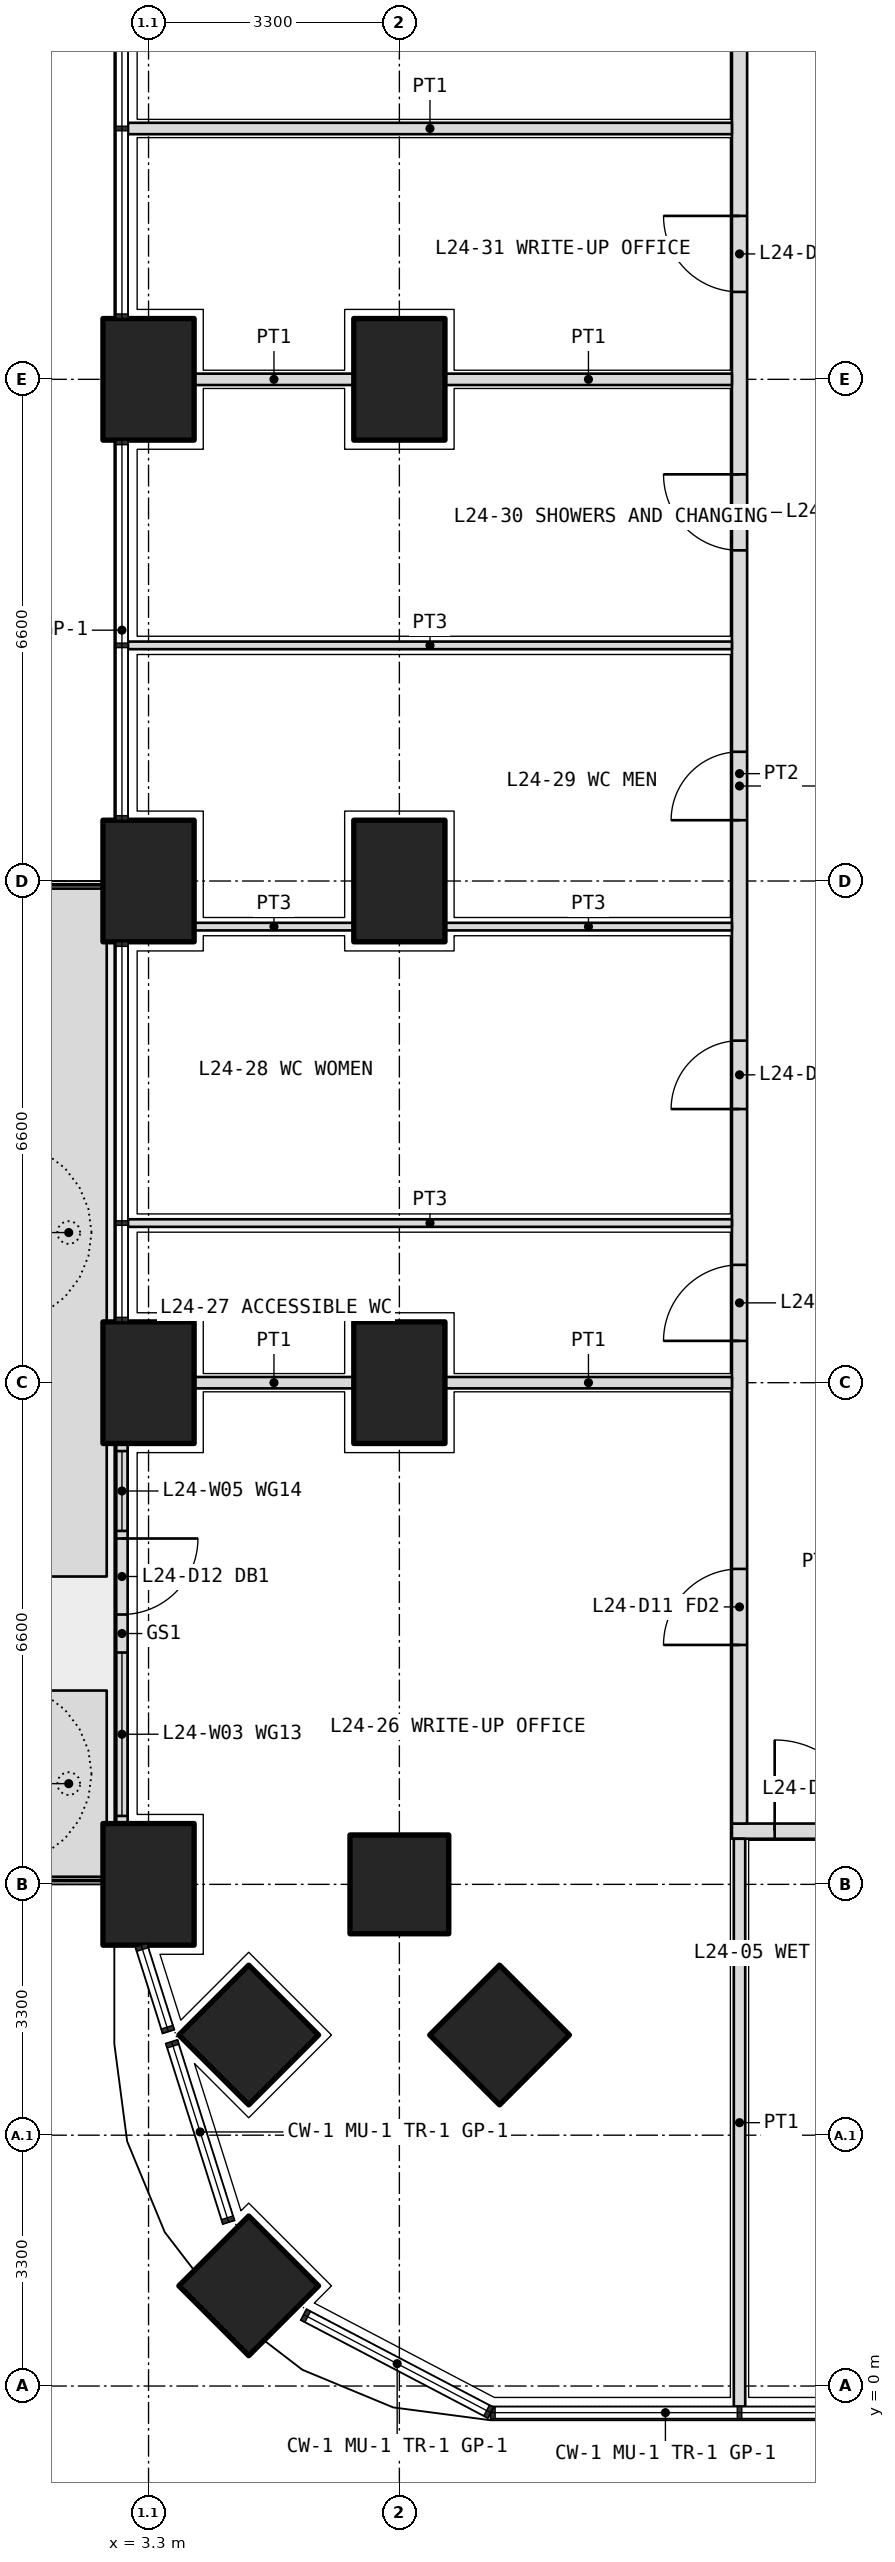
"""IFC4 building model, lengths in metres.
Left out: names, types, materials, properties, quantities, classifications, styles, units other than length and angle.
Written with IfcOpenShell. Run it as: python <this file> out.ifc"""

import sys

from ifc_helpers import new_model, si_unit, direction, frame, frame_2d, origin, origin_2d, place, context, subcontext, project, spatial, polyline, rectangle, outline, extrude, element, fill, save


model = new_model("IFC4")
c1 = context("Model", 3, precision=1e-05, world=origin(), true_north=direction((0.0, 1.0)))
c2 = subcontext(c1, "Body", "Model", "MODEL_VIEW")
j1 = project(units=[si_unit("LENGTHUNIT", "METRE"), si_unit("PLANEANGLEUNIT", "RADIAN")], contexts=[c1])
p1 = place(None, origin())
s1 = spatial("IfcSite", under=j1, at=p1, CompositionType="ELEMENT")
p2 = place(p1, origin())
s2 = spatial("IfcBuilding", under=s1, at=p2, CompositionType="ELEMENT")
p3 = place(p2, frame((0.0, 0.0, 107.4)))
s3 = spatial("IfcBuildingStorey", under=s2, at=p3, CompositionType="ELEMENT", Elevation=107.4)
p4 = place(p3, frame((4.618, 1.318, 0.0), z_axis=(0.0, 0.0, 1.0), x_axis=(0.707106781187, 0.707106781187, 0.0)))
e1 = element("IfcColumn", 1, at=p4, inside=s3, PredefinedType="COLUMN", context=c2, shape_type="SweptSolid", body=[
    extrude(rectangle(XDim=1.3, YDim=1.3, at=origin_2d()), origin(), (0.0, 0.0, 1.0), 4.2),
])
for number, where, z_axis, x_axis in (
    (2, (3.3, 6.6, 0.0), (0.0, 0.0, 1.0), (0.0, 1.0, 0.0)),
    (3, (3.3, 13.2, 0.0), (0.0, 0.0, 1.0), (0.0, 1.0, 0.0)),
    (4, (3.3, 19.8, 0.0), (0.0, 0.0, 1.0), (0.0, 1.0, 0.0)),
    (5, (3.3, 26.4, 0.0), (0.0, 0.0, 1.0), (0.0, 1.0, 0.0)),
):
    element("IfcColumn", number, at=place(p3, frame(where, z_axis=z_axis, x_axis=x_axis)), inside=s3, PredefinedType="COLUMN", context=c2, shape_type="SweptSolid", body=[
        extrude(rectangle(XDim=1.6, YDim=1.2, at=origin_2d()), origin(), (0.0, 0.0, 1.0), 4.2),
    ])
for number, where, z_axis, x_axis in (
    (6, (6.6, 6.6, 0.0), (0.0, 0.0, 1.0), (1.0, 0.0, 0.0)),
    (7, (4.618, 4.618, 0.0), (0.0, 0.0, 1.0), (0.707, 0.707, 0.0)),
    (8, (7.918, 4.618, 0.0), (0.0, 0.0, 1.0), (0.707, 0.707, 0.0)),
):
    element("IfcColumn", number, at=place(p3, frame(where, z_axis=z_axis, x_axis=x_axis)), inside=s3, PredefinedType="COLUMN", context=c2, shape_type="SweptSolid", body=[
        extrude(rectangle(XDim=1.3, YDim=1.3, at=origin_2d()), origin(), (0.0, 0.0, 1.0), 4.2),
    ])
for number, where, z_axis, x_axis in (
    (9, (6.6, 13.2, 0.0), (0.0, 0.0, 1.0), (0.0, 1.0, 0.0)),
    (10, (6.6, 19.8, 0.0), (0.0, 0.0, 1.0), (0.0, 1.0, 0.0)),
    (11, (6.6, 26.4, 0.0), (0.0, 0.0, 1.0), (0.0, 1.0, 0.0)),
):
    element("IfcColumn", number, at=place(p3, frame(where, z_axis=z_axis, x_axis=x_axis)), inside=s3, PredefinedType="COLUMN", context=c2, shape_type="SweptSolid", body=[
        extrude(rectangle(XDim=1.6, YDim=1.2, at=origin_2d()), origin(), (0.0, 0.0, 1.0), 4.2),
    ])
p5 = place(p3, origin())
e12 = element("IfcWall", 12, at=p5, inside=s3, PredefinedType="USERDEFINED", context=c2, shape_type="SweptSolid", body=[
    extrude(outline(polyline([(1.75, 6.7), (2.75, 6.7), (2.75, 9.15), (1.75, 9.15), (1.75, 6.7)]), holes=[polyline([(1.9, 6.85), (2.6, 6.85), (2.6, 9.0), (1.9, 9.0), (1.9, 6.85)])]), origin(), (0.0, 0.0, 1.0), 1.05),
])
p6 = place(p3, origin())
e13 = element("IfcWall", 13, at=p6, inside=s3, PredefinedType="USERDEFINED", context=c2, shape_type="SweptSolid", body=[
    extrude(outline(polyline([(1.75, 10.65), (2.75, 10.65), (2.75, 19.7), (1.75, 19.7), (1.75, 10.65)]), holes=[polyline([(1.9, 10.8), (2.6, 10.8), (2.6, 19.55), (1.9, 19.55), (1.9, 10.8)])]), origin(), (0.0, 0.0, 1.0), 1.05),
])
p7 = place(p3, frame((2.95, 12.4, 0.0), z_axis=(0.0, 0.0, 1.0), x_axis=(0.0, -1.0, 0.0)))
e14 = element("IfcWall", 14, at=p7, inside=s3, PredefinedType="SOLIDWALL", context=c2, shape_type="SweptSolid", body=[
    extrude(rectangle(XDim=5.0, YDim=0.15, at=frame_2d((2.5, 0.0))), origin(), (0.0, 0.0, 1.0), 2.7),
])
p8 = place(p7, frame((1.25, 0.0, 0.0)))
e15 = element("IfcOpeningElement", 15, at=p8, cuts=e14, PredefinedType="OPENING", context=c2, shape_type="SweptSolid", body=[
    extrude(rectangle(XDim=1.0, YDim=2.4, at=frame_2d((0.5, 1.2))), frame((0.0, 0.085, 0.0), z_axis=(0.0, -1.0, 0.0), x_axis=(1.0, 0.0, 0.0)), (0.0, 0.0, 1.0), 0.17),
])
p9 = place(p7, frame((0.1, 0.0, 0.1)))
e16 = element("IfcOpeningElement", 16, at=p9, cuts=e14, PredefinedType="OPENING", context=c2, shape_type="SweptSolid", body=[
    extrude(rectangle(XDim=1.05, YDim=2.3, at=frame_2d((0.525, 1.15))), frame((0.0, 0.085, 0.0), z_axis=(0.0, -1.0, 0.0), x_axis=(1.0, 0.0, 0.0)), (0.0, 0.0, 1.0), 0.17),
])
p10 = place(p7, frame((2.75, 0.0, 0.1)))
e17 = element("IfcOpeningElement", 17, at=p10, cuts=e14, PredefinedType="OPENING", context=c2, shape_type="SweptSolid", body=[
    extrude(rectangle(XDim=2.15, YDim=2.3, at=frame_2d((1.075, 1.15))), frame((0.0, 0.085, 0.0), z_axis=(0.0, -1.0, 0.0), x_axis=(1.0, 0.0, 0.0)), (0.0, 0.0, 1.0), 0.17),
])
p11 = place(p3, frame((10.975, 7.3, 0.0), z_axis=(0.0, 0.0, 1.0), x_axis=(1.0, 0.0, 0.0)))
e18 = element("IfcWall", 18, at=p11, inside=s3, PredefinedType="PARTITIONING", context=c2, shape_type="SweptSolid", body=[
    extrude(rectangle(XDim=30.85, YDim=0.2, at=frame_2d((15.425, 0.0))), origin(), (0.0, 0.0, 1.0), 2.85),
])
p12 = place(p11, frame((0.562, 0.0, 0.0)))
e19 = element("IfcOpeningElement", 19, at=p12, cuts=e18, PredefinedType="OPENING", context=c2, shape_type="SweptSolid", body=[
    extrude(rectangle(XDim=1.2, YDim=2.1, at=frame_2d((0.6, 1.05))), frame((0.0, 0.11, 0.0), z_axis=(0.0, -1.0, 0.0), x_axis=(1.0, 0.0, 0.0)), (0.0, 0.0, 1.0), 0.22),
])
p13 = place(p11, frame((8.325, 0.0, 0.0)))
e20 = element("IfcOpeningElement", 20, at=p13, cuts=e18, PredefinedType="OPENING", context=c2, shape_type="SweptSolid", body=[
    extrude(rectangle(XDim=1.0, YDim=2.1, at=frame_2d((0.5, 1.05))), frame((0.0, 0.11, 0.0), z_axis=(0.0, -1.0, 0.0), x_axis=(1.0, 0.0, 0.0)), (0.0, 0.0, 1.0), 0.22),
])
p14 = place(p11, frame((16.475, 0.0, 0.0)))
e21 = element("IfcOpeningElement", 21, at=p14, cuts=e18, PredefinedType="OPENING", context=c2, shape_type="SweptSolid", body=[
    extrude(rectangle(XDim=1.2, YDim=2.1, at=frame_2d((0.6, 1.05))), frame((0.0, 0.11, 0.0), z_axis=(0.0, -1.0, 0.0), x_axis=(1.0, 0.0, 0.0)), (0.0, 0.0, 1.0), 0.22),
])
p15 = place(p11, frame((21.525, 0.0, 0.0)))
e22 = element("IfcOpeningElement", 22, at=p15, cuts=e18, PredefinedType="OPENING", context=c2, shape_type="SweptSolid", body=[
    extrude(rectangle(XDim=1.0, YDim=2.1, at=frame_2d((0.5, 1.05))), frame((0.0, 0.11, 0.0), z_axis=(0.0, -1.0, 0.0), x_axis=(1.0, 0.0, 0.0)), (0.0, 0.0, 1.0), 0.22),
])
p16 = place(p11, frame((27.538, 0.0, 0.0)))
e23 = element("IfcOpeningElement", 23, at=p16, cuts=e18, PredefinedType="OPENING", context=c2, shape_type="SweptSolid", body=[
    extrude(rectangle(XDim=1.0, YDim=2.1, at=frame_2d((0.5, 1.05))), frame((0.0, 0.11, 0.0), z_axis=(0.0, -1.0, 0.0), x_axis=(1.0, 0.0, 0.0)), (0.0, 0.0, 1.0), 0.22),
])
p17 = place(p3, frame((11.075, 7.4, 0.0), z_axis=(0.0, 0.0, 1.0), x_axis=(0.0, 1.0, 0.0)))
e24 = element("IfcWall", 24, at=p17, inside=s3, PredefinedType="PARTITIONING", context=c2, shape_type="SweptSolid", body=[
    extrude(rectangle(XDim=27.625, YDim=0.2, at=frame_2d((13.812, 0.0))), origin(), (0.0, 0.0, 1.0), 2.85),
])
p18 = place(p17, frame((2.35, 0.0, 0.0)))
e25 = element("IfcOpeningElement", 25, at=p18, cuts=e24, PredefinedType="OPENING", context=c2, shape_type="SweptSolid", body=[
    extrude(rectangle(XDim=1.0, YDim=2.1, at=frame_2d((0.5, 1.05))), frame((0.0, 0.11, 0.0), z_axis=(0.0, -1.0, 0.0), x_axis=(1.0, 0.0, 0.0)), (0.0, 0.0, 1.0), 0.22),
])
p19 = place(p17, frame((6.35, 0.0, 0.0)))
e26 = element("IfcOpeningElement", 26, at=p19, cuts=e24, PredefinedType="OPENING", context=c2, shape_type="SweptSolid", body=[
    extrude(rectangle(XDim=1.0, YDim=2.1, at=frame_2d((0.5, 1.05))), frame((0.0, 0.11, 0.0), z_axis=(0.0, -1.0, 0.0), x_axis=(1.0, 0.0, 0.0)), (0.0, 0.0, 1.0), 0.22),
])
p20 = place(p17, frame((9.4, 0.0, 0.0)))
e27 = element("IfcOpeningElement", 27, at=p20, cuts=e24, PredefinedType="OPENING", context=c2, shape_type="SweptSolid", body=[
    extrude(rectangle(XDim=0.9, YDim=2.1, at=frame_2d((0.45, 1.05))), frame((0.0, 0.11, 0.0), z_axis=(0.0, -1.0, 0.0), x_axis=(1.0, 0.0, 0.0)), (0.0, 0.0, 1.0), 0.22),
])
p21 = place(p17, frame((13.2, 0.0, 0.0)))
e28 = element("IfcOpeningElement", 28, at=p21, cuts=e24, PredefinedType="OPENING", context=c2, shape_type="SweptSolid", body=[
    extrude(rectangle(XDim=0.9, YDim=2.1, at=frame_2d((0.45, 1.05))), frame((0.0, 0.11, 0.0), z_axis=(0.0, -1.0, 0.0), x_axis=(1.0, 0.0, 0.0)), (0.0, 0.0, 1.0), 0.22),
])
p22 = place(p17, frame((16.75, 0.0, 0.0)))
e29 = element("IfcOpeningElement", 29, at=p22, cuts=e24, PredefinedType="OPENING", context=c2, shape_type="SweptSolid", body=[
    extrude(rectangle(XDim=1.0, YDim=2.1, at=frame_2d((0.5, 1.05))), frame((0.0, 0.11, 0.0), z_axis=(0.0, -1.0, 0.0), x_axis=(1.0, 0.0, 0.0)), (0.0, 0.0, 1.0), 0.22),
])
p23 = place(p17, frame((20.15, 0.0, 0.0)))
e30 = element("IfcOpeningElement", 30, at=p23, cuts=e24, PredefinedType="OPENING", context=c2, shape_type="SweptSolid", body=[
    extrude(rectangle(XDim=1.0, YDim=2.1, at=frame_2d((0.5, 1.05))), frame((0.0, 0.11, 0.0), z_axis=(0.0, -1.0, 0.0), x_axis=(1.0, 0.0, 0.0)), (0.0, 0.0, 1.0), 0.22),
])
p24 = place(p17, frame((24.512, 0.0, 0.0)))
e31 = element("IfcOpeningElement", 31, at=p24, cuts=e24, PredefinedType="OPENING", context=c2, shape_type="SweptSolid", body=[
    extrude(rectangle(XDim=1.0, YDim=2.1, at=frame_2d((0.5, 1.05))), frame((0.0, 0.11, 0.0), z_axis=(0.0, -1.0, 0.0), x_axis=(1.0, 0.0, 0.0)), (0.0, 0.0, 1.0), 0.22),
])
p25 = place(p3, frame((11.075, -0.27, 0.0), z_axis=(0.0, 0.0, 1.0), x_axis=(0.0, 1.0, 0.0)))
e32 = element("IfcWall", 32, at=p25, inside=s3, PredefinedType="PARTITIONING", context=c2, shape_type="SweptSolid", body=[
    extrude(rectangle(XDim=7.47, YDim=0.15, at=frame_2d((3.735, 0.0))), origin(), (0.0, 0.0, 1.0), 2.7),
])
p26 = place(p3, frame((3.03, 15.3, 0.0), z_axis=(0.0, 0.0, 1.0), x_axis=(1.0, 0.0, 0.0)))
e33 = element("IfcWall", 33, at=p26, inside=s3, PredefinedType="PARTITIONING", context=c2, shape_type="SweptSolid", body=[
    extrude(rectangle(XDim=7.945, YDim=0.1, at=frame_2d((3.973, 0.0))), origin(), (0.0, 0.0, 1.0), 2.7),
])
p27 = place(p3, frame((3.9, 19.2, 0.0), z_axis=(0.0, 0.0, 1.0), x_axis=(1.0, 0.0, 0.0)))
e34 = element("IfcWall", 34, at=p27, inside=s3, PredefinedType="PARTITIONING", context=c2, shape_type="SweptSolid", body=[
    extrude(rectangle(XDim=2.1, YDim=0.1, at=frame_2d((1.05, 0.0))), origin(), (0.0, 0.0, 1.0), 2.85),
])
p28 = place(p3, frame((7.2, 19.2, 0.0), z_axis=(0.0, 0.0, 1.0), x_axis=(1.0, 0.0, 0.0)))
e35 = element("IfcWall", 35, at=p28, inside=s3, PredefinedType="PARTITIONING", context=c2, shape_type="SweptSolid", body=[
    extrude(rectangle(XDim=3.775, YDim=0.1, at=frame_2d((1.888, 0.0))), origin(), (0.0, 0.0, 1.0), 2.85),
])
p29 = place(p3, frame((3.03, 22.9, 0.0), z_axis=(0.0, 0.0, 1.0), x_axis=(1.0, 0.0, 0.0)))
e36 = element("IfcWall", 36, at=p29, inside=s3, PredefinedType="PARTITIONING", context=c2, shape_type="SweptSolid", body=[
    extrude(rectangle(XDim=7.945, YDim=0.1, at=frame_2d((3.973, 0.0))), origin(), (0.0, 0.0, 1.0), 2.7),
])
p30 = place(p3, frame((3.9, 13.2, 0.0), z_axis=(0.0, 0.0, 1.0), x_axis=(1.0, 0.0, 0.0)))
e37 = element("IfcWall", 37, at=p30, inside=s3, PredefinedType="PARTITIONING", context=c2, shape_type="SweptSolid", body=[
    extrude(rectangle(XDim=2.1, YDim=0.15, at=frame_2d((1.05, 0.0))), origin(), (0.0, 0.0, 1.0), 2.85),
])
p31 = place(p3, frame((7.2, 13.2, 0.0), z_axis=(0.0, 0.0, 1.0), x_axis=(1.0, 0.0, 0.0)))
e38 = element("IfcWall", 38, at=p31, inside=s3, PredefinedType="PARTITIONING", context=c2, shape_type="SweptSolid", body=[
    extrude(rectangle(XDim=3.775, YDim=0.15, at=frame_2d((1.888, 0.0))), origin(), (0.0, 0.0, 1.0), 2.85),
])
p32 = place(p3, frame((3.9, 26.4, 0.0), z_axis=(0.0, 0.0, 1.0), x_axis=(1.0, 0.0, 0.0)))
e39 = element("IfcWall", 39, at=p32, inside=s3, PredefinedType="PARTITIONING", context=c2, shape_type="SweptSolid", body=[
    extrude(rectangle(XDim=2.1, YDim=0.15, at=frame_2d((1.05, 0.0))), origin(), (0.0, 0.0, 1.0), 2.85),
])
p33 = place(p3, frame((7.2, 26.4, 0.0), z_axis=(0.0, 0.0, 1.0), x_axis=(1.0, 0.0, 0.0)))
e40 = element("IfcWall", 40, at=p33, inside=s3, PredefinedType="PARTITIONING", context=c2, shape_type="SweptSolid", body=[
    extrude(rectangle(XDim=3.775, YDim=0.15, at=frame_2d((1.888, 0.0))), origin(), (0.0, 0.0, 1.0), 2.85),
])
p34 = place(p3, frame((3.03, 29.7, 0.0), z_axis=(0.0, 0.0, 1.0), x_axis=(1.0, 0.0, 0.0)))
e41 = element("IfcWall", 41, at=p34, inside=s3, PredefinedType="PARTITIONING", context=c2, shape_type="SweptSolid", body=[
    extrude(rectangle(XDim=7.945, YDim=0.15, at=frame_2d((3.973, 0.0))), origin(), (0.0, 0.0, 1.0), 2.7),
])
p35 = place(p8, origin())
e42 = element("IfcDoor", 42, at=p35, inside=s3, OperationType="SINGLE_SWING_LEFT", PredefinedType="DOOR", context=c2, shape_type="SweptSolid", body=[
    extrude(rectangle(XDim=1.0, YDim=2.4, at=frame_2d((0.5, 1.2))), frame((0.0, 0.025, 0.0), z_axis=(0.0, -1.0, 0.0), x_axis=(1.0, 0.0, 0.0)), (0.0, 0.0, 1.0), 0.05),
])
fill(e15, e42)
p36 = place(p9, origin())
e43 = element("IfcWindow", 43, at=p36, inside=s3, PartitioningType="SINGLE_PANEL", PredefinedType="WINDOW", context=c2, shape_type="SweptSolid", body=[
    extrude(rectangle(XDim=1.05, YDim=2.3, at=frame_2d((0.525, 1.15))), frame((0.0, 0.03, 0.0), z_axis=(0.0, -1.0, 0.0), x_axis=(1.0, 0.0, 0.0)), (0.0, 0.0, 1.0), 0.06),
])
fill(e16, e43)
p37 = place(p10, origin())
e44 = element("IfcWindow", 44, at=p37, inside=s3, PartitioningType="SINGLE_PANEL", PredefinedType="WINDOW", context=c2, shape_type="SweptSolid", body=[
    extrude(rectangle(XDim=2.15, YDim=2.3, at=frame_2d((1.075, 1.15))), frame((0.0, 0.03, 0.0), z_axis=(0.0, -1.0, 0.0), x_axis=(1.0, 0.0, 0.0)), (0.0, 0.0, 1.0), 0.06),
])
fill(e17, e44)
p38 = place(p12, origin())
e45 = element("IfcDoor", 45, at=p38, inside=s3, OperationType="DOUBLE_DOOR_SINGLE_SWING", PredefinedType="DOOR", context=c2, shape_type="SweptSolid", body=[
    extrude(rectangle(XDim=1.2, YDim=2.1, at=frame_2d((0.6, 1.05))), frame((0.0, 0.025, 0.0), z_axis=(0.0, -1.0, 0.0), x_axis=(1.0, 0.0, 0.0)), (0.0, 0.0, 1.0), 0.05),
])
fill(e19, e45)
p39 = place(p18, origin())
e46 = element("IfcDoor", 46, at=p39, inside=s3, OperationType="SINGLE_SWING_LEFT", PredefinedType="DOOR", context=c2, shape_type="SweptSolid", body=[
    extrude(rectangle(XDim=1.0, YDim=2.1, at=frame_2d((0.5, 1.05))), frame((0.0, 0.025, 0.0), z_axis=(0.0, -1.0, 0.0), x_axis=(1.0, 0.0, 0.0)), (0.0, 0.0, 1.0), 0.05),
])
fill(e25, e46)
p40 = place(p19, origin())
e47 = element("IfcDoor", 47, at=p40, inside=s3, OperationType="SINGLE_SWING_LEFT", PredefinedType="DOOR", context=c2, shape_type="SweptSolid", body=[
    extrude(rectangle(XDim=1.0, YDim=2.1, at=frame_2d((0.5, 1.05))), frame((0.0, 0.025, 0.0), z_axis=(0.0, -1.0, 0.0), x_axis=(1.0, 0.0, 0.0)), (0.0, 0.0, 1.0), 0.05),
])
fill(e26, e47)
p41 = place(p20, origin())
e48 = element("IfcDoor", 48, at=p41, inside=s3, OperationType="SINGLE_SWING_LEFT", PredefinedType="DOOR", context=c2, shape_type="SweptSolid", body=[
    extrude(rectangle(XDim=0.9, YDim=2.1, at=frame_2d((0.45, 1.05))), frame((0.0, 0.025, 0.0), z_axis=(0.0, -1.0, 0.0), x_axis=(1.0, 0.0, 0.0)), (0.0, 0.0, 1.0), 0.05),
])
fill(e27, e48)
p42 = place(p21, origin())
e49 = element("IfcDoor", 49, at=p42, inside=s3, OperationType="SINGLE_SWING_LEFT", PredefinedType="DOOR", context=c2, shape_type="SweptSolid", body=[
    extrude(rectangle(XDim=0.9, YDim=2.1, at=frame_2d((0.45, 1.05))), frame((0.0, 0.025, 0.0), z_axis=(0.0, -1.0, 0.0), x_axis=(1.0, 0.0, 0.0)), (0.0, 0.0, 1.0), 0.05),
])
fill(e28, e49)
p43 = place(p22, origin())
e50 = element("IfcDoor", 50, at=p43, inside=s3, OperationType="SINGLE_SWING_RIGHT", PredefinedType="DOOR", context=c2, shape_type="SweptSolid", body=[
    extrude(rectangle(XDim=1.0, YDim=2.1, at=frame_2d((0.5, 1.05))), frame((0.0, 0.025, 0.0), z_axis=(0.0, -1.0, 0.0), x_axis=(1.0, 0.0, 0.0)), (0.0, 0.0, 1.0), 0.05),
])
fill(e29, e50)
p44 = place(p23, origin())
e51 = element("IfcDoor", 51, at=p44, inside=s3, OperationType="SINGLE_SWING_RIGHT", PredefinedType="DOOR", context=c2, shape_type="SweptSolid", body=[
    extrude(rectangle(XDim=1.0, YDim=2.1, at=frame_2d((0.5, 1.05))), frame((0.0, 0.025, 0.0), z_axis=(0.0, -1.0, 0.0), x_axis=(1.0, 0.0, 0.0)), (0.0, 0.0, 1.0), 0.05),
])
fill(e30, e51)
save(model, sys.argv[1])
